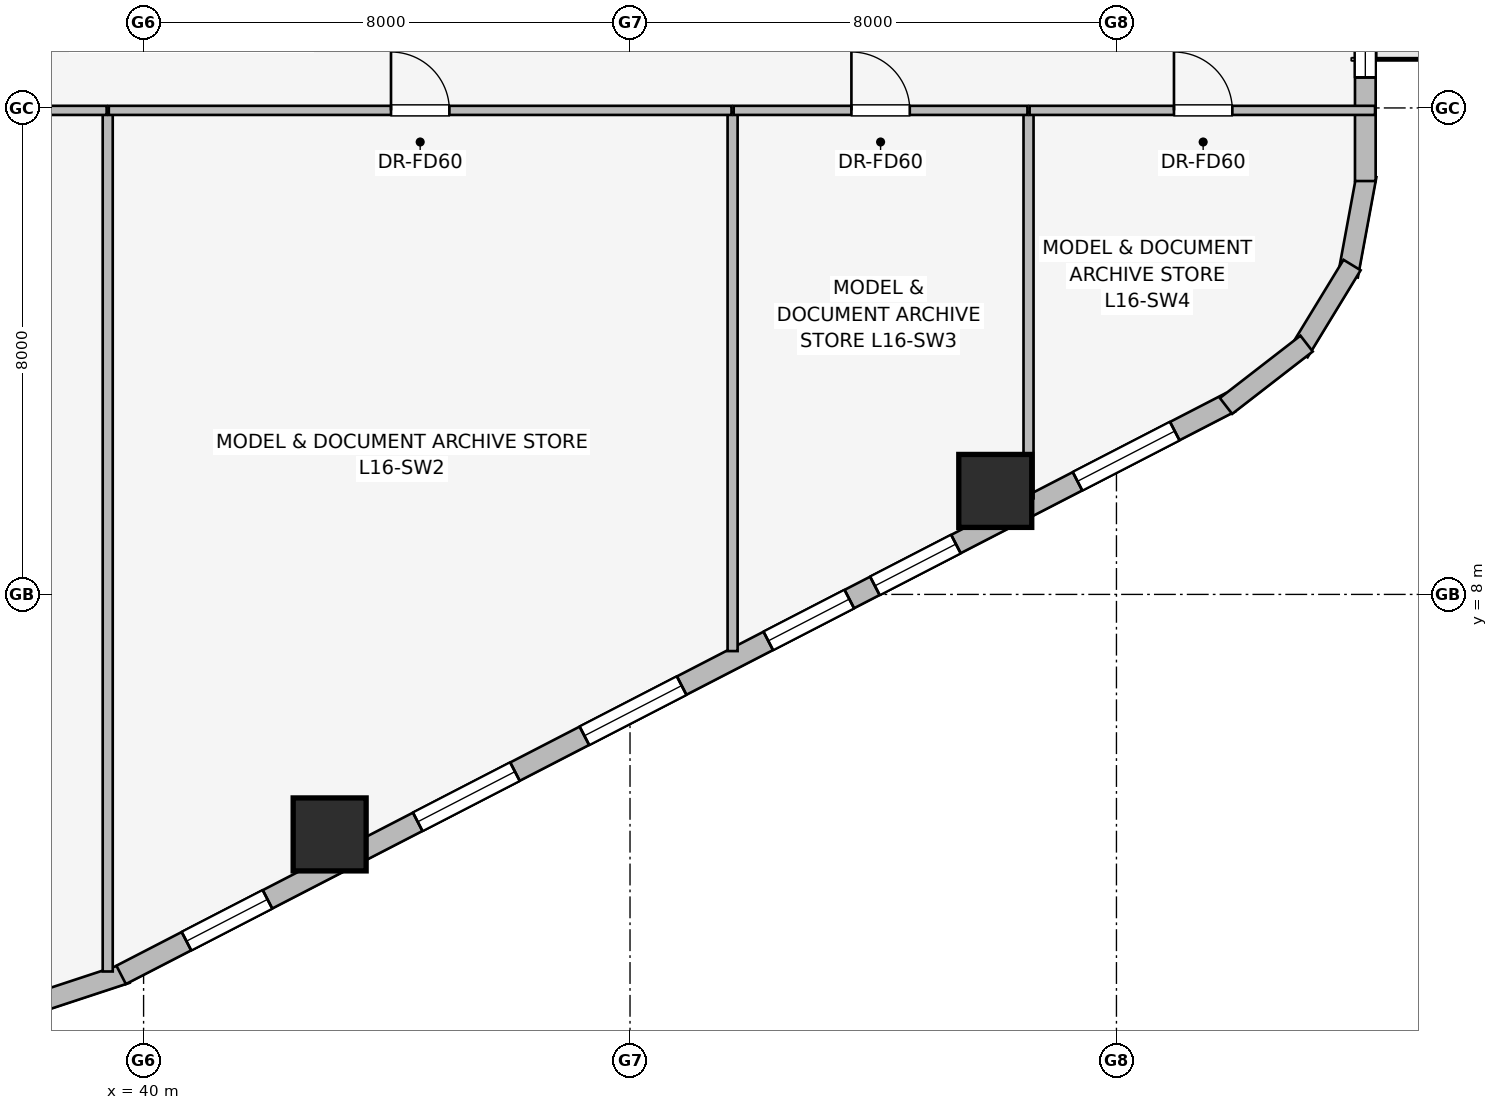
"""IFC4 building model, lengths in metres.
Left out: names, types, materials, properties, quantities, classifications, styles, units other than length and angle.
Written with IfcOpenShell. Run it as: python <this file> out.ifc"""

import sys

from ifc_helpers import new_model, si_unit, direction, frame, frame_2d, origin, origin_2d, place, context, subcontext, project, spatial, rectangle, extrude, element, fill, save


model = new_model("IFC4")
c1 = context("Model", 3, precision=1e-05, world=origin(), true_north=direction((0.0, 1.0)))
c2 = subcontext(c1, "Body", "Model", "MODEL_VIEW")
j1 = project(units=[si_unit("LENGTHUNIT", "METRE"), si_unit("PLANEANGLEUNIT", "RADIAN")], contexts=[c1])
p1 = place(None, origin())
s1 = spatial("IfcSite", under=j1, at=p1, CompositionType="ELEMENT")
p2 = place(p1, origin())
s2 = spatial("IfcBuilding", under=s1, at=p2, CompositionType="ELEMENT")
p3 = place(p2, frame((0.0, 0.0, 63.5)))
s3 = spatial("IfcBuildingStorey", under=s2, at=p3, CompositionType="ELEMENT", Elevation=63.5)
for number, where, z_axis, x_axis in (
    (1, (43.06, 4.053, 0.0), (0.0, 0.0, 1.0), (1.0, 0.0, 0.0)),
    (2, (54.007, 9.702, 0.0), (0.0, 0.0, 1.0), (1.0, 0.0, 0.0)),
):
    element("IfcColumn", number, at=place(p3, frame(where, z_axis=z_axis, x_axis=x_axis)), inside=s3, PredefinedType="COLUMN", context=c2, shape_type="SweptSolid", body=[
        extrude(rectangle(XDim=1.2, YDim=1.2, at=origin_2d()), origin(), (0.0, 0.0, 1.0), 3.65),
    ])
p4 = place(p3, frame((39.719, 1.769, 0.0), z_axis=(0.0, 0.0, 1.0), x_axis=(-0.94976901097, -0.312951794691, 0.0)))
e3 = element("IfcWall", 3, at=p4, inside=s3, PredefinedType="STANDARD", context=c2, shape_type="SweptSolid", body=[
    extrude(rectangle(XDim=1.722, YDim=0.33, at=frame_2d((0.861, 0.0))), origin(), (0.0, 0.0, 1.0), 3.39),
])
p5 = place(p3, frame((57.876, 11.159, 0.0), z_axis=(0.0, 0.0, 1.0), x_axis=(-0.888634413993, -0.458616264721, 0.0)))
e4 = element("IfcWall", 4, at=p5, inside=s3, PredefinedType="STANDARD", context=c2, shape_type="SweptSolid", body=[
    extrude(rectangle(XDim=20.531, YDim=0.34, at=frame_2d((10.266, 0.0))), origin(), (0.0, 0.0, 1.0), 2.684),
])
p6 = place(p5, frame((1.032, 0.0, 0.75)))
e5 = element("IfcOpeningElement", 5, at=p6, cuts=e4, PredefinedType="OPENING", context=c2, shape_type="SweptSolid", body=[
    extrude(rectangle(XDim=1.8, YDim=1.5, at=frame_2d((0.9, 0.75))), frame((0.0, 0.18, 0.0), z_axis=(0.0, -1.0, 0.0), x_axis=(1.0, 0.0, 0.0)), (0.0, 0.0, 1.0), 0.36),
])
p7 = place(p5, frame((5.082, 0.0, 0.75)))
e6 = element("IfcOpeningElement", 6, at=p7, cuts=e4, PredefinedType="OPENING", context=c2, shape_type="SweptSolid", body=[
    extrude(rectangle(XDim=1.5, YDim=1.5, at=frame_2d((0.75, 0.75))), frame((0.0, 0.18, 0.0), z_axis=(0.0, -1.0, 0.0), x_axis=(1.0, 0.0, 0.0)), (0.0, 0.0, 1.0), 0.36),
])
p8 = place(p5, frame((7.055, 0.0, 0.75)))
e7 = element("IfcOpeningElement", 7, at=p8, cuts=e4, PredefinedType="OPENING", context=c2, shape_type="SweptSolid", body=[
    extrude(rectangle(XDim=1.5, YDim=1.5, at=frame_2d((0.75, 0.75))), frame((0.0, 0.18, 0.0), z_axis=(0.0, -1.0, 0.0), x_axis=(1.0, 0.0, 0.0)), (0.0, 0.0, 1.0), 0.36),
])
p9 = place(p5, frame((10.158, 0.0, 0.75)))
e8 = element("IfcOpeningElement", 8, at=p9, cuts=e4, PredefinedType="OPENING", context=c2, shape_type="SweptSolid", body=[
    extrude(rectangle(XDim=1.8, YDim=1.5, at=frame_2d((0.9, 0.75))), frame((0.0, 0.18, 0.0), z_axis=(0.0, -1.0, 0.0), x_axis=(1.0, 0.0, 0.0)), (0.0, 0.0, 1.0), 0.36),
])
p10 = place(p5, frame((13.243, 0.0, 0.75)))
e9 = element("IfcOpeningElement", 9, at=p10, cuts=e4, PredefinedType="OPENING", context=c2, shape_type="SweptSolid", body=[
    extrude(rectangle(XDim=1.8, YDim=1.5, at=frame_2d((0.9, 0.75))), frame((0.0, 0.18, 0.0), z_axis=(0.0, -1.0, 0.0), x_axis=(1.0, 0.0, 0.0)), (0.0, 0.0, 1.0), 0.36),
])
p11 = place(p5, frame((17.823, 0.0, 0.75)))
e10 = element("IfcOpeningElement", 10, at=p11, cuts=e4, PredefinedType="OPENING", context=c2, shape_type="SweptSolid", body=[
    extrude(rectangle(XDim=1.5, YDim=1.5, at=frame_2d((0.75, 0.75))), frame((0.0, 0.18, 0.0), z_axis=(0.0, -1.0, 0.0), x_axis=(1.0, 0.0, 0.0)), (0.0, 0.0, 1.0), 0.36),
])
p12 = place(p3, frame((60.113, 14.892, 0.0), z_axis=(0.0, 0.0, 1.0), x_axis=(-0.181714143354, -0.983351397063, 0.0)))
e11 = element("IfcWall", 11, at=p12, inside=s3, PredefinedType="STANDARD", context=c2, shape_type="SweptSolid", body=[
    extrude(rectangle(XDim=1.678, YDim=0.33, at=frame_2d((0.839, 0.0))), origin(), (0.0, 0.0, 1.0), 3.39),
])
p13 = place(p3, frame((59.875, 13.417, 0.0), z_axis=(0.0, 0.0, 1.0), x_axis=(-0.520584129191, -0.853810379671, 0.0)))
e12 = element("IfcWall", 12, at=p13, inside=s3, PredefinedType="STANDARD", context=c2, shape_type="SweptSolid", body=[
    extrude(rectangle(XDim=1.677, YDim=0.33, at=frame_2d((0.838, 0.0))), origin(), (0.0, 0.0, 1.0), 3.39),
])
p14 = place(p3, frame((59.127, 12.125, 0.0), z_axis=(0.0, 0.0, 1.0), x_axis=(-0.790691856293, -0.61221433207, 0.0)))
e13 = element("IfcWall", 13, at=p14, inside=s3, PredefinedType="STANDARD", context=c2, shape_type="SweptSolid", body=[
    extrude(rectangle(XDim=1.676, YDim=0.33, at=frame_2d((0.838, 0.0))), origin(), (0.0, 0.0, 1.0), 3.39),
])
p15 = place(p3, frame((60.093, 33.202, 0.0), z_axis=(0.0, 0.0, 1.0), x_axis=(0.0, -1.0, 0.0)))
e14 = element("IfcWall", 14, at=p15, inside=s3, PredefinedType="STANDARD", context=c2, shape_type="SweptSolid", body=[
    extrude(rectangle(XDim=18.404, YDim=0.34, at=frame_2d((9.202, 0.0))), origin(), (0.0, 0.0, 1.0), 2.684),
])
p16 = place(p15, frame((10.227, 0.0, 0.0)))
e15 = element("IfcOpeningElement", 15, at=p16, cuts=e14, PredefinedType="OPENING", context=c2, shape_type="SweptSolid", body=[
    extrude(rectangle(XDim=1.65, YDim=2.25, at=frame_2d((0.825, 1.125))), frame((0.0, 0.18, 0.0), z_axis=(0.0, -1.0, 0.0), x_axis=(1.0, 0.0, 0.0)), (0.0, 0.0, 1.0), 0.36),
])
p17 = place(p15, frame((1.744, 0.0, 0.75)))
e16 = element("IfcOpeningElement", 16, at=p17, cuts=e14, PredefinedType="OPENING", context=c2, shape_type="SweptSolid", body=[
    extrude(rectangle(XDim=1.05, YDim=1.4, at=frame_2d((0.525, 0.7))), frame((0.0, 0.18, 0.0), z_axis=(0.0, -1.0, 0.0), x_axis=(1.0, 0.0, 0.0)), (0.0, 0.0, 1.0), 0.36),
])
p18 = place(p15, frame((4.949, 0.0, 0.75)))
e17 = element("IfcOpeningElement", 17, at=p18, cuts=e14, PredefinedType="OPENING", context=c2, shape_type="SweptSolid", body=[
    extrude(rectangle(XDim=1.5, YDim=1.5, at=frame_2d((0.75, 0.75))), frame((0.0, 0.18, 0.0), z_axis=(0.0, -1.0, 0.0), x_axis=(1.0, 0.0, 0.0)), (0.0, 0.0, 1.0), 0.36),
])
p19 = place(p15, frame((7.905, 0.0, 0.75)))
e18 = element("IfcOpeningElement", 18, at=p19, cuts=e14, PredefinedType="OPENING", context=c2, shape_type="SweptSolid", body=[
    extrude(rectangle(XDim=1.8, YDim=1.5, at=frame_2d((0.9, 0.75))), frame((0.0, 0.18, 0.0), z_axis=(0.0, -1.0, 0.0), x_axis=(1.0, 0.0, 0.0)), (0.0, 0.0, 1.0), 0.36),
])
p20 = place(p15, frame((15.65, 0.0, 0.75)))
e19 = element("IfcOpeningElement", 19, at=p20, cuts=e14, PredefinedType="OPENING", context=c2, shape_type="SweptSolid", body=[
    extrude(rectangle(XDim=1.05, YDim=1.4, at=frame_2d((0.525, 0.7))), frame((0.0, 0.18, 0.0), z_axis=(0.0, -1.0, 0.0), x_axis=(1.0, 0.0, 0.0)), (0.0, 0.0, 1.0), 0.36),
])
p21 = place(p3, frame((39.41, 1.799, 0.0), z_axis=(0.0, 0.0, 1.0), x_axis=(0.0, 1.0, 0.0)))
e20 = element("IfcWall", 20, at=p21, inside=s3, PredefinedType="PARTITIONING", context=c2, shape_type="SweptSolid", body=[
    extrude(rectangle(XDim=14.131, YDim=0.165, at=frame_2d((7.065, 0.0))), origin(), (0.0, 0.0, 1.0), 3.39),
])
p22 = place(p3, frame((49.687, 7.068, 0.0), z_axis=(0.0, 0.0, 1.0), x_axis=(0.0, 1.0, 0.0)))
e21 = element("IfcWall", 21, at=p22, inside=s3, PredefinedType="PARTITIONING", context=c2, shape_type="SweptSolid", body=[
    extrude(rectangle(XDim=8.862, YDim=0.165, at=frame_2d((4.431, 0.0))), origin(), (0.0, 0.0, 1.0), 3.39),
])
p23 = place(p3, frame((54.554, 9.58, 0.0), z_axis=(0.0, 0.0, 1.0), x_axis=(0.0, 1.0, 0.0)))
e22 = element("IfcWall", 22, at=p23, inside=s3, PredefinedType="PARTITIONING", context=c2, shape_type="SweptSolid", body=[
    extrude(rectangle(XDim=6.35, YDim=0.165, at=frame_2d((3.175, 0.0))), origin(), (0.0, 0.0, 1.0), 3.39),
])
p24 = place(p3, frame((32.85, 15.96, 0.0), z_axis=(0.0, 0.0, 1.0), x_axis=(1.0, 0.0, 0.0)))
e23 = element("IfcWall", 23, at=p24, inside=s3, PredefinedType="PARTITIONING", context=c2, shape_type="SweptSolid", body=[
    extrude(rectangle(XDim=6.542, YDim=0.15, at=frame_2d((3.271, 0.0))), origin(), (0.0, 0.0, 1.0), 3.39),
])
p25 = place(p24, frame((2.791, 0.0, 0.0)))
e24 = element("IfcOpeningElement", 24, at=p25, cuts=e23, PredefinedType="OPENING", context=c2, shape_type="SweptSolid", body=[
    extrude(rectangle(XDim=0.96, YDim=2.0, at=frame_2d((0.48, 1.0))), frame((0.0, 0.085, 0.0), z_axis=(0.0, -1.0, 0.0), x_axis=(1.0, 0.0, 0.0)), (0.0, 0.0, 1.0), 0.17),
])
p26 = place(p3, frame((39.428, 15.96, 0.0), z_axis=(0.0, 0.0, 1.0), x_axis=(1.0, 0.0, 0.0)))
e25 = element("IfcWall", 25, at=p26, inside=s3, PredefinedType="PARTITIONING", context=c2, shape_type="SweptSolid", body=[
    extrude(rectangle(XDim=10.241, YDim=0.15, at=frame_2d((5.121, 0.0))), origin(), (0.0, 0.0, 1.0), 3.39),
])
p27 = place(p26, frame((4.641, 0.0, 0.0)))
e26 = element("IfcOpeningElement", 26, at=p27, cuts=e25, PredefinedType="OPENING", context=c2, shape_type="SweptSolid", body=[
    extrude(rectangle(XDim=0.96, YDim=2.0, at=frame_2d((0.48, 1.0))), frame((0.0, 0.085, 0.0), z_axis=(0.0, -1.0, 0.0), x_axis=(1.0, 0.0, 0.0)), (0.0, 0.0, 1.0), 0.17),
])
p28 = place(p3, frame((49.705, 15.96, 0.0), z_axis=(0.0, 0.0, 1.0), x_axis=(1.0, 0.0, 0.0)))
e27 = element("IfcWall", 27, at=p28, inside=s3, PredefinedType="PARTITIONING", context=c2, shape_type="SweptSolid", body=[
    extrude(rectangle(XDim=4.831, YDim=0.15, at=frame_2d((2.416, 0.0))), origin(), (0.0, 0.0, 1.0), 3.39),
])
p29 = place(p28, frame((1.936, 0.0, 0.0)))
e28 = element("IfcOpeningElement", 28, at=p29, cuts=e27, PredefinedType="OPENING", context=c2, shape_type="SweptSolid", body=[
    extrude(rectangle(XDim=0.96, YDim=2.0, at=frame_2d((0.48, 1.0))), frame((0.0, 0.085, 0.0), z_axis=(0.0, -1.0, 0.0), x_axis=(1.0, 0.0, 0.0)), (0.0, 0.0, 1.0), 0.17),
])
p30 = place(p3, frame((54.572, 15.96, 0.0), z_axis=(0.0, 0.0, 1.0), x_axis=(1.0, 0.0, 0.0)))
e29 = element("IfcWall", 29, at=p30, inside=s3, PredefinedType="PARTITIONING", context=c2, shape_type="SweptSolid", body=[
    extrude(rectangle(XDim=5.681, YDim=0.15, at=frame_2d((2.84, 0.0))), origin(), (0.0, 0.0, 1.0), 3.39),
])
p31 = place(p30, frame((2.374, 0.0, 0.0)))
e30 = element("IfcOpeningElement", 30, at=p31, cuts=e29, PredefinedType="OPENING", context=c2, shape_type="SweptSolid", body=[
    extrude(rectangle(XDim=0.96, YDim=2.0, at=frame_2d((0.48, 1.0))), frame((0.0, 0.085, 0.0), z_axis=(0.0, -1.0, 0.0), x_axis=(1.0, 0.0, 0.0)), (0.0, 0.0, 1.0), 0.17),
])
p32 = place(p6, origin())
e31 = element("IfcWindow", 31, at=p32, inside=s3, PartitioningType="SINGLE_PANEL", PredefinedType="WINDOW", context=c2, shape_type="SweptSolid", body=[
    extrude(rectangle(XDim=1.8, YDim=1.5, at=frame_2d((0.9, 0.75))), frame((0.0, 0.03, 0.0), z_axis=(0.0, -1.0, 0.0), x_axis=(1.0, 0.0, 0.0)), (0.0, 0.0, 1.0), 0.06),
])
fill(e5, e31)
p33 = place(p7, origin())
e32 = element("IfcWindow", 32, at=p33, inside=s3, PartitioningType="SINGLE_PANEL", PredefinedType="WINDOW", context=c2, shape_type="SweptSolid", body=[
    extrude(rectangle(XDim=1.5, YDim=1.5, at=frame_2d((0.75, 0.75))), frame((0.0, 0.03, 0.0), z_axis=(0.0, -1.0, 0.0), x_axis=(1.0, 0.0, 0.0)), (0.0, 0.0, 1.0), 0.06),
])
fill(e6, e32)
p34 = place(p8, origin())
e33 = element("IfcWindow", 33, at=p34, inside=s3, PartitioningType="SINGLE_PANEL", PredefinedType="WINDOW", context=c2, shape_type="SweptSolid", body=[
    extrude(rectangle(XDim=1.5, YDim=1.5, at=frame_2d((0.75, 0.75))), frame((0.0, 0.03, 0.0), z_axis=(0.0, -1.0, 0.0), x_axis=(1.0, 0.0, 0.0)), (0.0, 0.0, 1.0), 0.06),
])
fill(e7, e33)
p35 = place(p9, origin())
e34 = element("IfcWindow", 34, at=p35, inside=s3, PartitioningType="SINGLE_PANEL", PredefinedType="WINDOW", context=c2, shape_type="SweptSolid", body=[
    extrude(rectangle(XDim=1.8, YDim=1.5, at=frame_2d((0.9, 0.75))), frame((0.0, 0.03, 0.0), z_axis=(0.0, -1.0, 0.0), x_axis=(1.0, 0.0, 0.0)), (0.0, 0.0, 1.0), 0.06),
])
fill(e8, e34)
p36 = place(p10, origin())
e35 = element("IfcWindow", 35, at=p36, inside=s3, PartitioningType="SINGLE_PANEL", PredefinedType="WINDOW", context=c2, shape_type="SweptSolid", body=[
    extrude(rectangle(XDim=1.8, YDim=1.5, at=frame_2d((0.9, 0.75))), frame((0.0, 0.03, 0.0), z_axis=(0.0, -1.0, 0.0), x_axis=(1.0, 0.0, 0.0)), (0.0, 0.0, 1.0), 0.06),
])
fill(e9, e35)
p37 = place(p11, origin())
e36 = element("IfcWindow", 36, at=p37, inside=s3, PartitioningType="SINGLE_PANEL", PredefinedType="WINDOW", context=c2, shape_type="SweptSolid", body=[
    extrude(rectangle(XDim=1.5, YDim=1.5, at=frame_2d((0.75, 0.75))), frame((0.0, 0.03, 0.0), z_axis=(0.0, -1.0, 0.0), x_axis=(1.0, 0.0, 0.0)), (0.0, 0.0, 1.0), 0.06),
])
fill(e10, e36)
p38 = place(p20, origin())
e37 = element("IfcWindow", 37, at=p38, inside=s3, PartitioningType="SINGLE_PANEL", PredefinedType="WINDOW", context=c2, shape_type="SweptSolid", body=[
    extrude(rectangle(XDim=1.05, YDim=1.4, at=frame_2d((0.525, 0.7))), frame((0.0, 0.03, 0.0), z_axis=(0.0, -1.0, 0.0), x_axis=(1.0, 0.0, 0.0)), (0.0, 0.0, 1.0), 0.06),
])
fill(e19, e37)
p39 = place(p27, origin())
e38 = element("IfcDoor", 38, at=p39, inside=s3, OperationType="SINGLE_SWING_LEFT", PredefinedType="DOOR", context=c2, shape_type="SweptSolid", body=[
    extrude(rectangle(XDim=0.96, YDim=2.0, at=frame_2d((0.48, 1.0))), frame((0.0, 0.025, 0.0), z_axis=(0.0, -1.0, 0.0), x_axis=(1.0, 0.0, 0.0)), (0.0, 0.0, 1.0), 0.05),
])
fill(e26, e38)
p40 = place(p29, origin())
e39 = element("IfcDoor", 39, at=p40, inside=s3, OperationType="SINGLE_SWING_LEFT", PredefinedType="DOOR", context=c2, shape_type="SweptSolid", body=[
    extrude(rectangle(XDim=0.96, YDim=2.0, at=frame_2d((0.48, 1.0))), frame((0.0, 0.025, 0.0), z_axis=(0.0, -1.0, 0.0), x_axis=(1.0, 0.0, 0.0)), (0.0, 0.0, 1.0), 0.05),
])
fill(e28, e39)
p41 = place(p31, origin())
e40 = element("IfcDoor", 40, at=p41, inside=s3, OperationType="SINGLE_SWING_LEFT", PredefinedType="DOOR", context=c2, shape_type="SweptSolid", body=[
    extrude(rectangle(XDim=0.96, YDim=2.0, at=frame_2d((0.48, 1.0))), frame((0.0, 0.025, 0.0), z_axis=(0.0, -1.0, 0.0), x_axis=(1.0, 0.0, 0.0)), (0.0, 0.0, 1.0), 0.05),
])
fill(e30, e40)
save(model, sys.argv[1])
